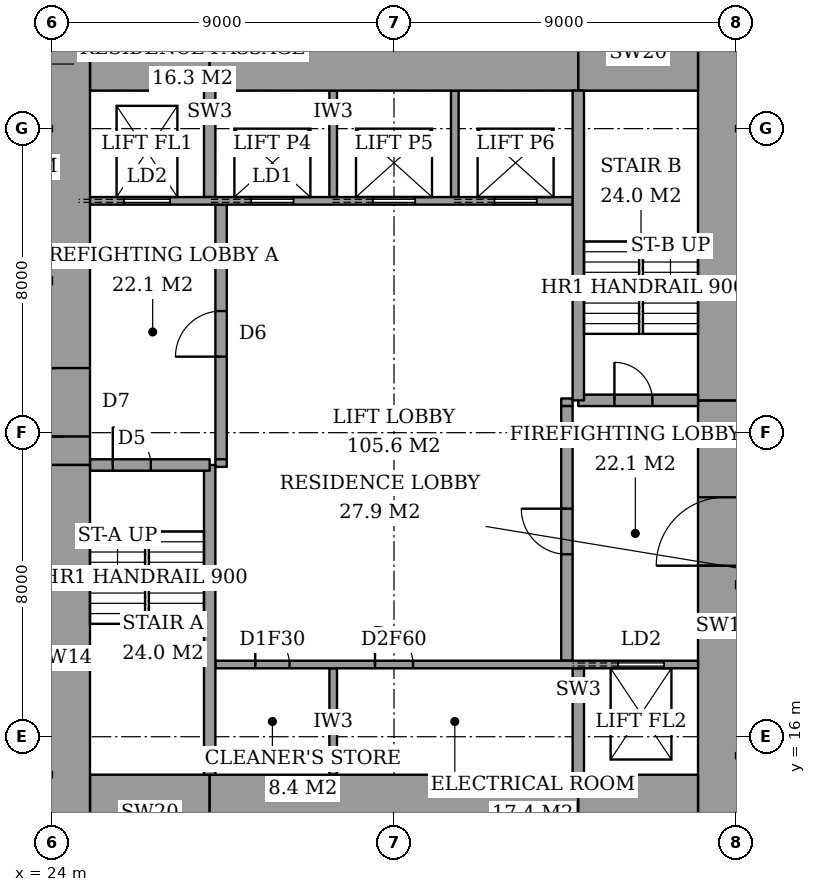
"""IFC4 building model, lengths in metres.
Left out: names, types, materials, properties, quantities, classifications, styles, units other than length and angle.
Written with IfcOpenShell. Run it as: python <this file> out.ifc"""

import sys

from ifc_helpers import new_model, si_unit, direction, frame, frame_2d, origin, place, context, subcontext, project, spatial, rectangle, extrude, element, fill, save


model = new_model("IFC4")
c1 = context("Model", 3, precision=1e-05, world=origin(), true_north=direction((0.0, 1.0)))
c2 = subcontext(c1, "Body", "Model", "MODEL_VIEW")
j1 = project(units=[si_unit("LENGTHUNIT", "METRE"), si_unit("PLANEANGLEUNIT", "RADIAN")], contexts=[c1])
p1 = place(None, origin())
s1 = spatial("IfcSite", under=j1, at=p1, CompositionType="ELEMENT")
p2 = place(p1, origin())
s2 = spatial("IfcBuilding", under=s1, at=p2, CompositionType="ELEMENT")
p3 = place(p2, frame((0.0, 0.0, 185.8)))
s3 = spatial("IfcBuildingStorey", under=s2, at=p3, CompositionType="ELEMENT", Elevation=185.8)
p4 = place(p3, frame((25.0, 14.0, 0.0), z_axis=(0.0, 0.0, 1.0), x_axis=(1.0, 0.0, 0.0)))
e1 = element("IfcWall", 1, at=p4, inside=s3, PredefinedType="SHEAR", context=c2, shape_type="SweptSolid", body=[
    extrude(rectangle(XDim=3.15, YDim=2.0, at=frame_2d((1.575, 0.0))), origin(), (0.0, 0.0, 1.0), 3.6),
])
p5 = place(p3, frame((28.15, 14.0, 0.0), z_axis=(0.0, 0.0, 1.0), x_axis=(1.0, 0.0, 0.0)))
e2 = element("IfcWall", 2, at=p5, inside=s3, PredefinedType="SHEAR", context=c2, shape_type="SweptSolid", body=[
    extrude(rectangle(XDim=9.7, YDim=2.0, at=frame_2d((4.85, 0.0))), origin(), (0.0, 0.0, 1.0), 3.6),
])
for number, where, z_axis, x_axis in (
    (3, (37.85, 14.0, 0.0), (0.0, 0.0, 1.0), (1.0, 0.0, 0.0)),
    (4, (25.0, 34.0, 0.0), (0.0, 0.0, 1.0), (1.0, 0.0, 0.0)),
):
    element("IfcWall", number, at=place(p3, frame(where, z_axis=z_axis, x_axis=x_axis)), inside=s3, PredefinedType="SHEAR", context=c2, shape_type="SweptSolid", body=[
        extrude(rectangle(XDim=3.15, YDim=2.0, at=frame_2d((1.575, 0.0))), origin(), (0.0, 0.0, 1.0), 3.6),
    ])
p6 = place(p3, frame((28.15, 34.0, 0.0), z_axis=(0.0, 0.0, 1.0), x_axis=(1.0, 0.0, 0.0)))
e5 = element("IfcWall", 5, at=p6, inside=s3, PredefinedType="SHEAR", context=c2, shape_type="SweptSolid", body=[
    extrude(rectangle(XDim=9.7, YDim=2.0, at=frame_2d((4.85, 0.0))), origin(), (0.0, 0.0, 1.0), 3.6),
])
p7 = place(p3, frame((37.85, 34.0, 0.0), z_axis=(0.0, 0.0, 1.0), x_axis=(1.0, 0.0, 0.0)))
e6 = element("IfcWall", 6, at=p7, inside=s3, PredefinedType="SHEAR", context=c2, shape_type="SweptSolid", body=[
    extrude(rectangle(XDim=3.15, YDim=2.0, at=frame_2d((1.575, 0.0))), origin(), (0.0, 0.0, 1.0), 3.6),
])
p8 = place(p3, frame((24.3, 13.0, 0.0), z_axis=(0.0, 0.0, 1.0), x_axis=(0.0, 1.0, 0.0)))
e7 = element("IfcWall", 7, at=p8, inside=s3, PredefinedType="SHEAR", context=c2, shape_type="SweptSolid", body=[
    extrude(rectangle(XDim=10.15, YDim=1.4, at=frame_2d((5.075, 0.0))), origin(), (0.0, 0.0, 1.0), 3.6),
])
p9 = place(p3, frame((24.3, 23.15, 0.0), z_axis=(0.0, 0.0, 1.0), x_axis=(0.0, 1.0, 0.0)))
e8 = element("IfcWall", 8, at=p9, inside=s3, PredefinedType="SHEAR", context=c2, shape_type="SweptSolid", body=[
    extrude(rectangle(XDim=11.85, YDim=1.4, at=frame_2d((5.925, 0.0))), origin(), (0.0, 0.0, 1.0), 3.6),
])
p10 = place(p9, frame((0.75, 0.0, 0.0)))
e9 = element("IfcOpeningElement", 9, at=p10, cuts=e8, PredefinedType="OPENING", context=c2, shape_type="SweptSolid", body=[
    extrude(rectangle(XDim=1.8, YDim=2.4, at=frame_2d((0.9, 1.2))), frame((0.0, 0.71, 0.0), z_axis=(0.0, -1.0, 0.0), x_axis=(1.0, 0.0, 0.0)), (0.0, 0.0, 1.0), 1.42),
])
p11 = place(p3, frame((41.7, 13.0, 0.0), z_axis=(0.0, 0.0, 1.0), x_axis=(0.0, 1.0, 0.0)))
e10 = element("IfcWall", 10, at=p11, inside=s3, PredefinedType="SHEAR", context=c2, shape_type="SweptSolid", body=[
    extrude(rectangle(XDim=11.85, YDim=1.4, at=frame_2d((5.925, 0.0))), origin(), (0.0, 0.0, 1.0), 3.6),
])
p12 = place(p11, frame((7.5, 0.0, 0.0)))
e11 = element("IfcOpeningElement", 11, at=p12, cuts=e10, PredefinedType="OPENING", context=c2, shape_type="SweptSolid", body=[
    extrude(rectangle(XDim=1.8, YDim=2.4, at=frame_2d((0.9, 1.2))), frame((0.0, 0.71, 0.0), z_axis=(0.0, -1.0, 0.0), x_axis=(1.0, 0.0, 0.0)), (0.0, 0.0, 1.0), 1.42),
])
p13 = place(p3, frame((41.7, 24.85, 0.0), z_axis=(0.0, 0.0, 1.0), x_axis=(0.0, 1.0, 0.0)))
e12 = element("IfcWall", 12, at=p13, inside=s3, PredefinedType="SHEAR", context=c2, shape_type="SweptSolid", body=[
    extrude(rectangle(XDim=10.15, YDim=1.4, at=frame_2d((5.075, 0.0))), origin(), (0.0, 0.0, 1.0), 3.6),
])
p14 = place(p3, frame((28.15, 15.0, 0.0), z_axis=(0.0, 0.0, 1.0), x_axis=(0.0, 1.0, 0.0)))
e13 = element("IfcWall", 13, at=p14, inside=s3, PredefinedType="SHEAR", context=c2, shape_type="SweptSolid", body=[
    extrude(rectangle(XDim=8.15, YDim=0.3, at=frame_2d((4.075, 0.0))), origin(), (0.0, 0.0, 1.0), 3.6),
])
p15 = place(p3, frame((25.0, 23.15, 0.0), z_axis=(0.0, 0.0, 1.0), x_axis=(1.0, 0.0, 0.0)))
e14 = element("IfcWall", 14, at=p15, inside=s3, PredefinedType="SHEAR", context=c2, shape_type="SweptSolid", body=[
    extrude(rectangle(XDim=3.15, YDim=0.3, at=frame_2d((1.575, 0.0))), origin(), (0.0, 0.0, 1.0), 3.6),
])
p16 = place(p15, frame((0.6, 0.0, 0.0)))
e15 = element("IfcOpeningElement", 15, at=p16, cuts=e14, PredefinedType="OPENING", context=c2, shape_type="SweptSolid", body=[
    extrude(rectangle(XDim=1.0, YDim=2.1, at=frame_2d((0.5, 1.05))), frame((0.0, 0.16, 0.0), z_axis=(0.0, -1.0, 0.0), x_axis=(1.0, 0.0, 0.0)), (0.0, 0.0, 1.0), 0.32),
])
p17 = place(p3, frame((37.85, 24.85, 0.0), z_axis=(0.0, 0.0, 1.0), x_axis=(0.0, 1.0, 0.0)))
e16 = element("IfcWall", 16, at=p17, inside=s3, PredefinedType="SHEAR", context=c2, shape_type="SweptSolid", body=[
    extrude(rectangle(XDim=8.15, YDim=0.3, at=frame_2d((4.075, 0.0))), origin(), (0.0, 0.0, 1.0), 3.6),
])
p18 = place(p3, frame((37.85, 24.85, 0.0), z_axis=(0.0, 0.0, 1.0), x_axis=(1.0, 0.0, 0.0)))
e17 = element("IfcWall", 17, at=p18, inside=s3, PredefinedType="SHEAR", context=c2, shape_type="SweptSolid", body=[
    extrude(rectangle(XDim=3.15, YDim=0.3, at=frame_2d((1.575, 0.0))), origin(), (0.0, 0.0, 1.0), 3.6),
])
p19 = place(p18, frame((0.95, 0.0, 0.0)))
e18 = element("IfcOpeningElement", 18, at=p19, cuts=e17, PredefinedType="OPENING", context=c2, shape_type="SweptSolid", body=[
    extrude(rectangle(XDim=1.0, YDim=2.1, at=frame_2d((0.5, 1.05))), frame((0.0, 0.16, 0.0), z_axis=(0.0, -1.0, 0.0), x_axis=(1.0, 0.0, 0.0)), (0.0, 0.0, 1.0), 0.32),
])
p20 = place(p3, frame((28.45, 23.3, 0.0), z_axis=(0.0, 0.0, 1.0), x_axis=(0.0, 1.0, 0.0)))
e19 = element("IfcWall", 19, at=p20, inside=s3, PredefinedType="PARTITIONING", context=c2, shape_type="SweptSolid", body=[
    extrude(rectangle(XDim=6.7, YDim=0.3, at=frame_2d((3.35, 0.0))), origin(), (0.0, 0.0, 1.0), 3.6),
])
p21 = place(p20, frame((2.7, 0.0, 0.0)))
e20 = element("IfcOpeningElement", 20, at=p21, cuts=e19, PredefinedType="OPENING", context=c2, shape_type="SweptSolid", body=[
    extrude(rectangle(XDim=1.2, YDim=2.1, at=frame_2d((0.6, 1.05))), frame((0.0, 0.16, 0.0), z_axis=(0.0, -1.0, 0.0), x_axis=(1.0, 0.0, 0.0)), (0.0, 0.0, 1.0), 0.32),
])
p22 = place(p3, frame((37.55, 18.0, 0.0), z_axis=(0.0, 0.0, 1.0), x_axis=(0.0, 1.0, 0.0)))
e21 = element("IfcWall", 21, at=p22, inside=s3, PredefinedType="PARTITIONING", context=c2, shape_type="SweptSolid", body=[
    extrude(rectangle(XDim=6.7, YDim=0.3, at=frame_2d((3.35, 0.0))), origin(), (0.0, 0.0, 1.0), 3.6),
])
p23 = place(p22, frame((2.8, 0.0, 0.0)))
e22 = element("IfcOpeningElement", 22, at=p23, cuts=e21, PredefinedType="OPENING", context=c2, shape_type="SweptSolid", body=[
    extrude(rectangle(XDim=1.2, YDim=2.1, at=frame_2d((0.6, 1.05))), frame((0.0, 0.16, 0.0), z_axis=(0.0, -1.0, 0.0), x_axis=(1.0, 0.0, 0.0)), (0.0, 0.0, 1.0), 0.32),
])
p24 = place(p3, frame((28.3, 17.9, 0.0), z_axis=(0.0, 0.0, 1.0), x_axis=(1.0, 0.0, 0.0)))
e23 = element("IfcWall", 23, at=p24, inside=s3, PredefinedType="PARTITIONING", context=c2, shape_type="SweptSolid", body=[
    extrude(rectangle(XDim=12.7, YDim=0.2, at=frame_2d((6.35, 0.0))), origin(), (0.0, 0.0, 1.0), 3.6),
])
p25 = place(p24, frame((1.05, 0.0, 0.0)))
e24 = element("IfcOpeningElement", 24, at=p25, cuts=e23, PredefinedType="OPENING", context=c2, shape_type="SweptSolid", body=[
    extrude(rectangle(XDim=0.9, YDim=2.1, at=frame_2d((0.45, 1.05))), frame((0.0, 0.11, 0.0), z_axis=(0.0, -1.0, 0.0), x_axis=(1.0, 0.0, 0.0)), (0.0, 0.0, 1.0), 0.22),
])
p26 = place(p24, frame((4.2, 0.0, 0.0)))
e25 = element("IfcOpeningElement", 25, at=p26, cuts=e23, PredefinedType="OPENING", context=c2, shape_type="SweptSolid", body=[
    extrude(rectangle(XDim=1.0, YDim=2.1, at=frame_2d((0.5, 1.05))), frame((0.0, 0.11, 0.0), z_axis=(0.0, -1.0, 0.0), x_axis=(1.0, 0.0, 0.0)), (0.0, 0.0, 1.0), 0.22),
])
p27 = place(p24, frame((10.6, 0.0, 0.0)))
e26 = element("IfcOpeningElement", 26, at=p27, cuts=e23, PredefinedType="OPENING", context=c2, shape_type="SweptSolid", body=[
    extrude(rectangle(XDim=1.2, YDim=2.1, at=frame_2d((0.6, 1.05))), frame((0.0, 0.11, 0.0), z_axis=(0.0, -1.0, 0.0), x_axis=(1.0, 0.0, 0.0)), (0.0, 0.0, 1.0), 0.22),
])
p28 = place(p3, frame((25.0, 30.1, 0.0), z_axis=(0.0, 0.0, 1.0), x_axis=(1.0, 0.0, 0.0)))
e27 = element("IfcWall", 27, at=p28, inside=s3, PredefinedType="PARTITIONING", context=c2, shape_type="SweptSolid", body=[
    extrude(rectangle(XDim=12.7, YDim=0.2, at=frame_2d((6.35, 0.0))), origin(), (0.0, 0.0, 1.0), 3.6),
])
p29 = place(p28, frame((4.25, 0.0, 0.0)))
e28 = element("IfcOpeningElement", 28, at=p29, cuts=e27, PredefinedType="OPENING", context=c2, shape_type="SweptSolid", body=[
    extrude(rectangle(XDim=1.1, YDim=2.1, at=frame_2d((0.55, 1.05))), frame((0.0, 0.11, 0.0), z_axis=(0.0, -1.0, 0.0), x_axis=(1.0, 0.0, 0.0)), (0.0, 0.0, 1.0), 0.22),
])
p30 = place(p28, frame((7.45, 0.0, 0.0)))
e29 = element("IfcOpeningElement", 29, at=p30, cuts=e27, PredefinedType="OPENING", context=c2, shape_type="SweptSolid", body=[
    extrude(rectangle(XDim=1.1, YDim=2.1, at=frame_2d((0.55, 1.05))), frame((0.0, 0.11, 0.0), z_axis=(0.0, -1.0, 0.0), x_axis=(1.0, 0.0, 0.0)), (0.0, 0.0, 1.0), 0.22),
])
p31 = place(p28, frame((10.65, 0.0, 0.0)))
e30 = element("IfcOpeningElement", 30, at=p31, cuts=e27, PredefinedType="OPENING", context=c2, shape_type="SweptSolid", body=[
    extrude(rectangle(XDim=1.1, YDim=2.1, at=frame_2d((0.55, 1.05))), frame((0.0, 0.11, 0.0), z_axis=(0.0, -1.0, 0.0), x_axis=(1.0, 0.0, 0.0)), (0.0, 0.0, 1.0), 0.22),
])
p32 = place(p28, frame((0.9, 0.0, 0.0)))
e31 = element("IfcOpeningElement", 31, at=p32, cuts=e27, PredefinedType="OPENING", context=c2, shape_type="SweptSolid", body=[
    extrude(rectangle(XDim=1.2, YDim=2.1, at=frame_2d((0.6, 1.05))), frame((0.0, 0.11, 0.0), z_axis=(0.0, -1.0, 0.0), x_axis=(1.0, 0.0, 0.0)), (0.0, 0.0, 1.0), 0.22),
])
p33 = place(p3, frame((31.4, 15.0, 0.0), z_axis=(0.0, 0.0, 1.0), x_axis=(0.0, 1.0, 0.0)))
e32 = element("IfcWall", 32, at=p33, inside=s3, PredefinedType="PARTITIONING", context=c2, shape_type="SweptSolid", body=[
    extrude(rectangle(XDim=2.8, YDim=0.2, at=frame_2d((1.4, 0.0))), origin(), (0.0, 0.0, 1.0), 3.6),
])
p34 = place(p3, frame((37.85, 15.0, 0.0), z_axis=(0.0, 0.0, 1.0), x_axis=(0.0, 1.0, 0.0)))
e33 = element("IfcWall", 33, at=p34, inside=s3, PredefinedType="SHEAR", context=c2, shape_type="SweptSolid", body=[
    extrude(rectangle(XDim=2.8, YDim=0.3, at=frame_2d((1.4, 0.0))), origin(), (0.0, 0.0, 1.0), 3.6),
])
for number, where, z_axis, x_axis in (
    (34, (31.4, 30.2, 0.0), (0.0, 0.0, 1.0), (0.0, 1.0, 0.0)),
    (35, (34.6, 30.2, 0.0), (0.0, 0.0, 1.0), (0.0, 1.0, 0.0)),
):
    element("IfcWall", number, at=place(p3, frame(where, z_axis=z_axis, x_axis=x_axis)), inside=s3, PredefinedType="PARTITIONING", context=c2, shape_type="SweptSolid", body=[
        extrude(rectangle(XDim=2.8, YDim=0.2, at=frame_2d((1.4, 0.0))), origin(), (0.0, 0.0, 1.0), 3.6),
    ])
p35 = place(p3, frame((28.15, 30.2, 0.0), z_axis=(0.0, 0.0, 1.0), x_axis=(0.0, 1.0, 0.0)))
e36 = element("IfcWall", 36, at=p35, inside=s3, PredefinedType="SHEAR", context=c2, shape_type="SweptSolid", body=[
    extrude(rectangle(XDim=2.8, YDim=0.3, at=frame_2d((1.4, 0.0))), origin(), (0.0, 0.0, 1.0), 3.6),
])
for number, where, z_axis, x_axis in (
    (37, (28.3, 23.2, 0.0), (0.0, 0.0, 1.0), (1.0, 0.0, 0.0)),
    (38, (37.4, 24.8, 0.0), (0.0, 0.0, 1.0), (1.0, 0.0, 0.0)),
):
    element("IfcWall", number, at=place(p3, frame(where, z_axis=z_axis, x_axis=x_axis)), inside=s3, PredefinedType="PARTITIONING", context=c2, shape_type="SweptSolid", body=[
        extrude(rectangle(XDim=0.3, YDim=0.2, at=frame_2d((0.15, 0.0))), origin(), (0.0, 0.0, 1.0), 3.6),
    ])
p36 = place(p16, origin())
e39 = element("IfcDoor", 39, at=p36, inside=s3, OperationType="SINGLE_SWING_RIGHT", PredefinedType="DOOR", context=c2, shape_type="SweptSolid", body=[
    extrude(rectangle(XDim=1.0, YDim=2.1, at=frame_2d((0.5, 1.05))), frame((0.0, 0.025, 0.0), z_axis=(0.0, -1.0, 0.0), x_axis=(1.0, 0.0, 0.0)), (0.0, 0.0, 1.0), 0.05),
])
fill(e15, e39)
p37 = place(p19, origin())
e40 = element("IfcDoor", 40, at=p37, inside=s3, OperationType="SINGLE_SWING_RIGHT", PredefinedType="DOOR", context=c2, shape_type="SweptSolid", body=[
    extrude(rectangle(XDim=1.0, YDim=2.1, at=frame_2d((0.5, 1.05))), frame((0.0, 0.025, 0.0), z_axis=(0.0, -1.0, 0.0), x_axis=(1.0, 0.0, 0.0)), (0.0, 0.0, 1.0), 0.05),
])
fill(e18, e40)
p38 = place(p21, origin())
e41 = element("IfcDoor", 41, at=p38, inside=s3, OperationType="SINGLE_SWING_RIGHT", PredefinedType="DOOR", context=c2, shape_type="SweptSolid", body=[
    extrude(rectangle(XDim=1.2, YDim=2.1, at=frame_2d((0.6, 1.05))), frame((0.0, 0.025, 0.0), z_axis=(0.0, -1.0, 0.0), x_axis=(1.0, 0.0, 0.0)), (0.0, 0.0, 1.0), 0.05),
])
fill(e20, e41)
p39 = place(p23, origin())
e42 = element("IfcDoor", 42, at=p39, inside=s3, OperationType="SINGLE_SWING_LEFT", PredefinedType="DOOR", context=c2, shape_type="SweptSolid", body=[
    extrude(rectangle(XDim=1.2, YDim=2.1, at=frame_2d((0.6, 1.05))), frame((0.0, 0.025, 0.0), z_axis=(0.0, -1.0, 0.0), x_axis=(1.0, 0.0, 0.0)), (0.0, 0.0, 1.0), 0.05),
])
fill(e22, e42)
p40 = place(p10, origin())
e43 = element("IfcDoor", 43, at=p40, inside=s3, OperationType="DOUBLE_DOOR_DOUBLE_SWING", PredefinedType="DOOR", context=c2, shape_type="SweptSolid", body=[
    extrude(rectangle(XDim=1.8, YDim=2.4, at=frame_2d((0.9, 1.2))), frame((0.0, 0.025, 0.0), z_axis=(0.0, -1.0, 0.0), x_axis=(1.0, 0.0, 0.0)), (0.0, 0.0, 1.0), 0.05),
])
fill(e9, e43)
p41 = place(p12, origin())
e44 = element("IfcDoor", 44, at=p41, inside=s3, OperationType="DOUBLE_DOOR_DOUBLE_SWING", PredefinedType="DOOR", context=c2, shape_type="SweptSolid", body=[
    extrude(rectangle(XDim=1.8, YDim=2.4, at=frame_2d((0.9, 1.2))), frame((0.0, 0.025, 0.0), z_axis=(0.0, -1.0, 0.0), x_axis=(1.0, 0.0, 0.0)), (0.0, 0.0, 1.0), 0.05),
])
fill(e11, e44)
p42 = place(p25, origin())
e45 = element("IfcDoor", 45, at=p42, inside=s3, OperationType="SINGLE_SWING_RIGHT", PredefinedType="DOOR", context=c2, shape_type="SweptSolid", body=[
    extrude(rectangle(XDim=0.9, YDim=2.1, at=frame_2d((0.45, 1.05))), frame((0.0, 0.025, 0.0), z_axis=(0.0, -1.0, 0.0), x_axis=(1.0, 0.0, 0.0)), (0.0, 0.0, 1.0), 0.05),
])
fill(e24, e45)
p43 = place(p26, origin())
e46 = element("IfcDoor", 46, at=p43, inside=s3, OperationType="SINGLE_SWING_RIGHT", PredefinedType="DOOR", context=c2, shape_type="SweptSolid", body=[
    extrude(rectangle(XDim=1.0, YDim=2.1, at=frame_2d((0.5, 1.05))), frame((0.0, 0.025, 0.0), z_axis=(0.0, -1.0, 0.0), x_axis=(1.0, 0.0, 0.0)), (0.0, 0.0, 1.0), 0.05),
])
fill(e25, e46)
p44 = place(p29, origin())
e47 = element("IfcDoor", 47, at=p44, inside=s3, OperationType="SLIDING_TO_LEFT", PredefinedType="DOOR", context=c2, shape_type="SweptSolid", body=[
    extrude(rectangle(XDim=1.1, YDim=2.1, at=frame_2d((0.55, 1.05))), frame((0.0, 0.025, 0.0), z_axis=(0.0, -1.0, 0.0), x_axis=(1.0, 0.0, 0.0)), (0.0, 0.0, 1.0), 0.05),
])
fill(e28, e47)
p45 = place(p30, origin())
e48 = element("IfcDoor", 48, at=p45, inside=s3, OperationType="SLIDING_TO_LEFT", PredefinedType="DOOR", context=c2, shape_type="SweptSolid", body=[
    extrude(rectangle(XDim=1.1, YDim=2.1, at=frame_2d((0.55, 1.05))), frame((0.0, 0.025, 0.0), z_axis=(0.0, -1.0, 0.0), x_axis=(1.0, 0.0, 0.0)), (0.0, 0.0, 1.0), 0.05),
])
fill(e29, e48)
p46 = place(p31, origin())
e49 = element("IfcDoor", 49, at=p46, inside=s3, OperationType="SLIDING_TO_LEFT", PredefinedType="DOOR", context=c2, shape_type="SweptSolid", body=[
    extrude(rectangle(XDim=1.1, YDim=2.1, at=frame_2d((0.55, 1.05))), frame((0.0, 0.025, 0.0), z_axis=(0.0, -1.0, 0.0), x_axis=(1.0, 0.0, 0.0)), (0.0, 0.0, 1.0), 0.05),
])
fill(e30, e49)
p47 = place(p32, origin())
e50 = element("IfcDoor", 50, at=p47, inside=s3, OperationType="SLIDING_TO_LEFT", PredefinedType="DOOR", context=c2, shape_type="SweptSolid", body=[
    extrude(rectangle(XDim=1.2, YDim=2.1, at=frame_2d((0.6, 1.05))), frame((0.0, 0.025, 0.0), z_axis=(0.0, -1.0, 0.0), x_axis=(1.0, 0.0, 0.0)), (0.0, 0.0, 1.0), 0.05),
])
fill(e31, e50)
p48 = place(p27, origin())
e51 = element("IfcDoor", 51, at=p48, inside=s3, OperationType="SLIDING_TO_LEFT", PredefinedType="DOOR", context=c2, shape_type="SweptSolid", body=[
    extrude(rectangle(XDim=1.2, YDim=2.1, at=frame_2d((0.6, 1.05))), frame((0.0, 0.025, 0.0), z_axis=(0.0, -1.0, 0.0), x_axis=(1.0, 0.0, 0.0)), (0.0, 0.0, 1.0), 0.05),
])
fill(e26, e51)
save(model, sys.argv[1])
